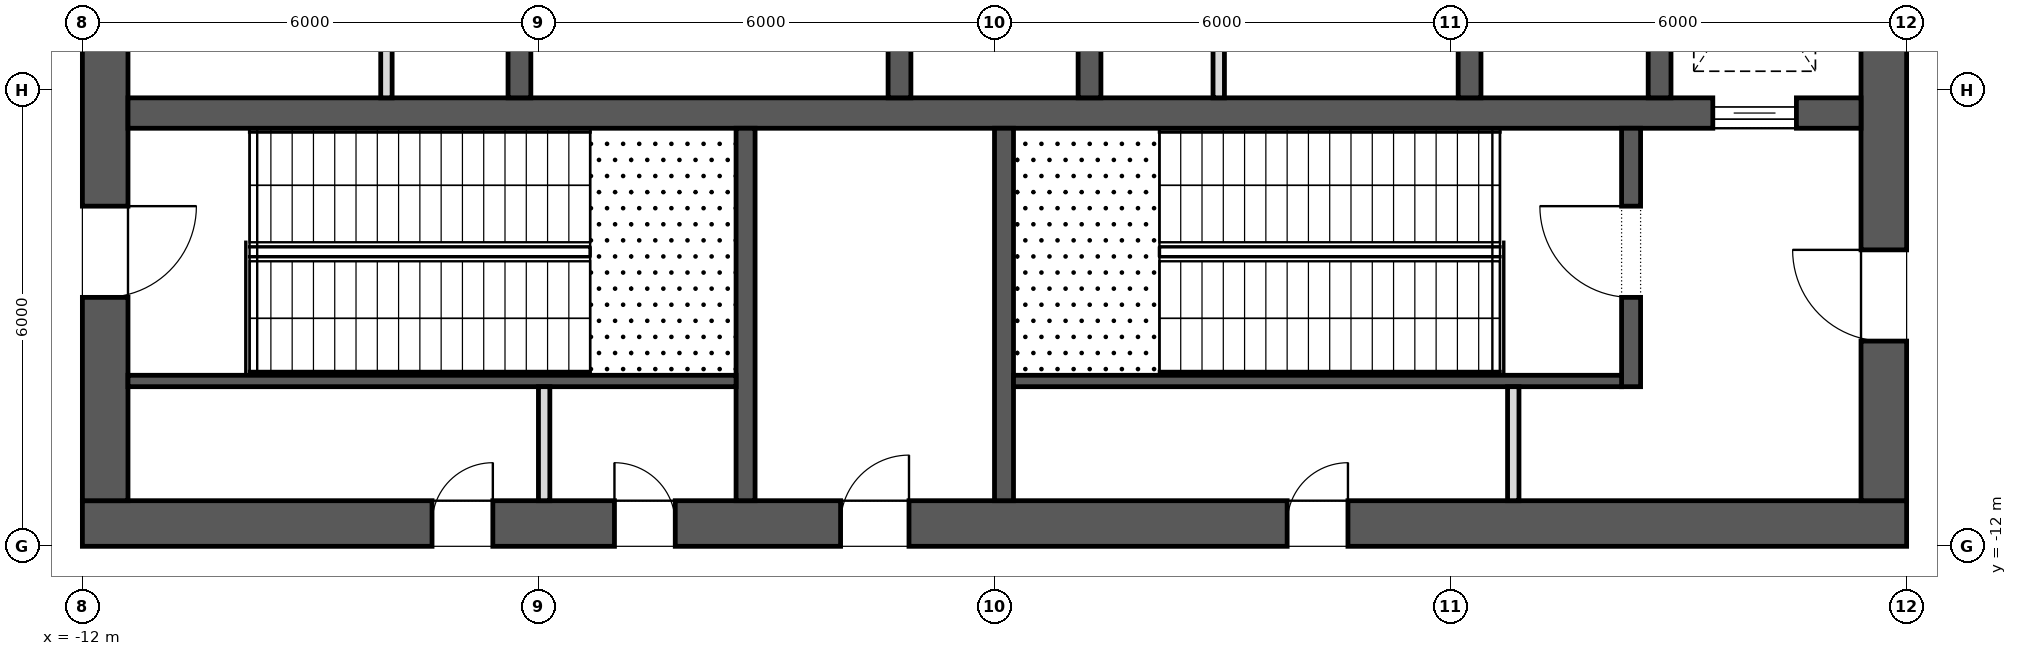
"""IFC4 building model, lengths in metres.
Left out: names, types, materials, properties, quantities, classifications, styles, units other than length and angle.
Written with IfcOpenShell. Run it as: python <this file> out.ifc"""

import sys

from ifc_helpers import new_model, si_unit, direction, frame, frame_2d, origin, place, context, subcontext, project, spatial, rectangle, extrude, element, fill, save


model = new_model("IFC4")
c1 = context("Model", 3, precision=1e-05, world=origin(), true_north=direction((0.0, 1.0)))
c2 = subcontext(c1, "Body", "Model", "MODEL_VIEW")
j1 = project(units=[si_unit("LENGTHUNIT", "METRE"), si_unit("PLANEANGLEUNIT", "RADIAN")], contexts=[c1])
p1 = place(None, origin())
s1 = spatial("IfcSite", under=j1, at=p1, CompositionType="ELEMENT")
p2 = place(p1, origin())
s2 = spatial("IfcBuilding", under=s1, at=p2, CompositionType="ELEMENT")
p3 = place(p2, frame((0.0, 0.0, 343.3)))
s3 = spatial("IfcBuildingStorey", under=s2, at=p3, CompositionType="ELEMENT", Elevation=343.3)
p4 = place(p3, frame((-12.0, -11.7, 0.0), z_axis=(0.0, 0.0, 1.0), x_axis=(1.0, 0.0, 0.0)))
e1 = element("IfcWall", 1, at=p4, inside=s3, PredefinedType="SHEAR", context=c2, shape_type="SweptSolid", body=[
    extrude(rectangle(XDim=24.0, YDim=0.6, at=frame_2d((12.0, 0.0))), origin(), (0.0, 0.0, 1.0), 6.0),
])
p5 = place(p4, frame((9.975, 0.0, 0.0)))
e2 = element("IfcOpeningElement", 2, at=p5, cuts=e1, PredefinedType="OPENING", context=c2, shape_type="SweptSolid", body=[
    extrude(rectangle(XDim=0.9, YDim=2.1, at=frame_2d((0.45, 1.05))), frame((0.0, 0.312, 0.0), z_axis=(0.0, -1.0, 0.0), x_axis=(1.0, 0.0, 0.0)), (0.0, 0.0, 1.0), 0.624),
])
p6 = place(p4, frame((4.6, 0.0, 0.0)))
e3 = element("IfcOpeningElement", 3, at=p6, cuts=e1, PredefinedType="OPENING", context=c2, shape_type="SweptSolid", body=[
    extrude(rectangle(XDim=0.8, YDim=2.1, at=frame_2d((0.4, 1.05))), frame((0.0, 0.312, 0.0), z_axis=(0.0, -1.0, 0.0), x_axis=(1.0, 0.0, 0.0)), (0.0, 0.0, 1.0), 0.624),
])
p7 = place(p4, frame((7.0, 0.0, 0.0)))
e4 = element("IfcOpeningElement", 4, at=p7, cuts=e1, PredefinedType="OPENING", context=c2, shape_type="SweptSolid", body=[
    extrude(rectangle(XDim=0.8, YDim=2.1, at=frame_2d((0.4, 1.05))), frame((0.0, 0.312, 0.0), z_axis=(0.0, -1.0, 0.0), x_axis=(1.0, 0.0, 0.0)), (0.0, 0.0, 1.0), 0.624),
])
p8 = place(p4, frame((15.85, 0.0, 0.0)))
e5 = element("IfcOpeningElement", 5, at=p8, cuts=e1, PredefinedType="OPENING", context=c2, shape_type="SweptSolid", body=[
    extrude(rectangle(XDim=0.8, YDim=2.1, at=frame_2d((0.4, 1.05))), frame((0.0, 0.312, 0.0), z_axis=(0.0, -1.0, 0.0), x_axis=(1.0, 0.0, 0.0)), (0.0, 0.0, 1.0), 0.624),
])
p9 = place(p3, frame((11.7, -11.4, 0.0), z_axis=(0.0, 0.0, 1.0), x_axis=(0.0, 1.0, 0.0)))
e6 = element("IfcWall", 6, at=p9, inside=s3, PredefinedType="SHEAR", context=c2, shape_type="SweptSolid", body=[
    extrude(rectangle(XDim=22.8, YDim=0.6, at=frame_2d((11.4, 0.0))), origin(), (0.0, 0.0, 1.0), 6.0),
])
p10 = place(p9, frame((10.2, 0.0, 0.0)))
e7 = element("IfcOpeningElement", 7, at=p10, cuts=e6, PredefinedType="OPENING", context=c2, shape_type="SweptSolid", body=[
    extrude(rectangle(XDim=2.4, YDim=2.1, at=frame_2d((1.2, 1.05))), frame((0.0, 0.312, 0.0), z_axis=(0.0, -1.0, 0.0), x_axis=(1.0, 0.0, 0.0)), (0.0, 0.0, 1.0), 0.624),
])
p11 = place(p9, frame((19.5, 0.0, 0.0)))
e8 = element("IfcOpeningElement", 8, at=p11, cuts=e6, PredefinedType="OPENING", context=c2, shape_type="SweptSolid", body=[
    extrude(rectangle(XDim=1.2, YDim=2.1, at=frame_2d((0.6, 1.05))), frame((0.0, 0.312, 0.0), z_axis=(0.0, -1.0, 0.0), x_axis=(1.0, 0.0, 0.0)), (0.0, 0.0, 1.0), 0.624),
])
p12 = place(p9, frame((2.1, 0.0, 0.0)))
e9 = element("IfcOpeningElement", 9, at=p12, cuts=e6, PredefinedType="OPENING", context=c2, shape_type="SweptSolid", body=[
    extrude(rectangle(XDim=1.2, YDim=2.1, at=frame_2d((0.6, 1.05))), frame((0.0, 0.312, 0.0), z_axis=(0.0, -1.0, 0.0), x_axis=(1.0, 0.0, 0.0)), (0.0, 0.0, 1.0), 0.624),
])
p13 = place(p3, frame((-11.7, -11.4, 0.0), z_axis=(0.0, 0.0, 1.0), x_axis=(0.0, 1.0, 0.0)))
e10 = element("IfcWall", 10, at=p13, inside=s3, PredefinedType="SHEAR", context=c2, shape_type="SweptSolid", body=[
    extrude(rectangle(XDim=22.8, YDim=0.6, at=frame_2d((11.4, 0.0))), origin(), (0.0, 0.0, 1.0), 6.0),
])
p14 = place(p13, frame((10.2, 0.0, 0.0)))
e11 = element("IfcOpeningElement", 11, at=p14, cuts=e10, PredefinedType="OPENING", context=c2, shape_type="SweptSolid", body=[
    extrude(rectangle(XDim=2.4, YDim=2.1, at=frame_2d((1.2, 1.05))), frame((0.0, 0.312, 0.0), z_axis=(0.0, -1.0, 0.0), x_axis=(1.0, 0.0, 0.0)), (0.0, 0.0, 1.0), 0.624),
])
p15 = place(p13, frame((18.925, 0.0, 0.0)))
e12 = element("IfcOpeningElement", 12, at=p15, cuts=e10, PredefinedType="OPENING", context=c2, shape_type="SweptSolid", body=[
    extrude(rectangle(XDim=1.2, YDim=2.1, at=frame_2d((0.6, 1.05))), frame((0.0, 0.312, 0.0), z_axis=(0.0, -1.0, 0.0), x_axis=(1.0, 0.0, 0.0)), (0.0, 0.0, 1.0), 0.624),
])
p16 = place(p13, frame((2.675, 0.0, 0.0)))
e13 = element("IfcOpeningElement", 13, at=p16, cuts=e10, PredefinedType="OPENING", context=c2, shape_type="SweptSolid", body=[
    extrude(rectangle(XDim=1.2, YDim=2.1, at=frame_2d((0.6, 1.05))), frame((0.0, 0.312, 0.0), z_axis=(0.0, -1.0, 0.0), x_axis=(1.0, 0.0, 0.0)), (0.0, 0.0, 1.0), 0.624),
])
p17 = place(p3, frame((-11.4, -6.3, 0.0), z_axis=(0.0, 0.0, 1.0), x_axis=(1.0, 0.0, 0.0)))
e14 = element("IfcWall", 14, at=p17, inside=s3, PredefinedType="SHEAR", context=c2, shape_type="SweptSolid", body=[
    extrude(rectangle(XDim=22.8, YDim=0.4, at=frame_2d((11.4, 0.0))), origin(), (0.0, 0.0, 1.0), 6.0),
])
p18 = place(p17, frame((20.85, 0.0, 0.0)))
e15 = element("IfcOpeningElement", 15, at=p18, cuts=e14, PredefinedType="OPENING", context=c2, shape_type="SweptSolid", body=[
    extrude(rectangle(XDim=1.1, YDim=2.1, at=frame_2d((0.55, 1.05))), frame((0.0, 0.212, 0.0), z_axis=(0.0, -1.0, 0.0), x_axis=(1.0, 0.0, 0.0)), (0.0, 0.0, 1.0), 0.424),
])
for number, where, z_axis, x_axis in (
    (16, (-6.25, -6.1, 0.0), (0.0, 0.0, 1.0), (0.0, 1.0, 0.0)),
    (17, (-1.25, -6.1, 0.0), (0.0, 0.0, 1.0), (0.0, 1.0, 0.0)),
    (18, (1.25, -6.1, 0.0), (0.0, 0.0, 1.0), (0.0, 1.0, 0.0)),
    (19, (6.25, -6.1, 0.0), (0.0, 0.0, 1.0), (0.0, 1.0, 0.0)),
    (20, (8.75, -6.1, 0.0), (0.0, 0.0, 1.0), (0.0, 1.0, 0.0)),
):
    element("IfcWall", number, at=place(p3, frame(where, z_axis=z_axis, x_axis=x_axis)), inside=s3, PredefinedType="SHEAR", context=c2, shape_type="SweptSolid", body=[
        extrude(rectangle(XDim=2.9, YDim=0.3, at=frame_2d((1.45, 0.0))), origin(), (0.0, 0.0, 1.0), 6.0),
    ])
for number, where, z_axis, x_axis in (
    (21, (-3.275, -11.4, 0.0), (0.0, 0.0, 1.0), (0.0, 1.0, 0.0)),
    (22, (0.125, -11.4, 0.0), (0.0, 0.0, 1.0), (0.0, 1.0, 0.0)),
):
    element("IfcWall", number, at=place(p3, frame(where, z_axis=z_axis, x_axis=x_axis)), inside=s3, PredefinedType="SHEAR", context=c2, shape_type="SweptSolid", body=[
        extrude(rectangle(XDim=4.9, YDim=0.25, at=frame_2d((2.45, 0.0))), origin(), (0.0, 0.0, 1.0), 5.65),
    ])
p19 = place(p3, frame((8.375, -9.9, 0.0), z_axis=(0.0, 0.0, 1.0), x_axis=(0.0, 1.0, 0.0)))
e23 = element("IfcWall", 23, at=p19, inside=s3, PredefinedType="SHEAR", context=c2, shape_type="SweptSolid", body=[
    extrude(rectangle(XDim=3.4, YDim=0.25, at=frame_2d((1.7, 0.0))), origin(), (0.0, 0.0, 1.0), 5.65),
])
p20 = place(p19, frame((1.175, 0.0, 0.0)))
e24 = element("IfcOpeningElement", 24, at=p20, cuts=e23, PredefinedType="OPENING", context=c2, shape_type="SweptSolid", body=[
    extrude(rectangle(XDim=1.2, YDim=2.1, at=frame_2d((0.6, 1.05))), frame((0.0, 0.137, 0.0), z_axis=(0.0, -1.0, 0.0), x_axis=(1.0, 0.0, 0.0)), (0.0, 0.0, 1.0), 0.274),
])
for number, where, z_axis, x_axis in (
    (25, (-11.4, -9.825, 0.0), (0.0, 0.0, 1.0), (1.0, 0.0, 0.0)),
    (26, (0.25, -9.825, 0.0), (0.0, 0.0, 1.0), (1.0, 0.0, 0.0)),
):
    element("IfcWall", number, at=place(p3, frame(where, z_axis=z_axis, x_axis=x_axis)), inside=s3, PredefinedType="SHEAR", context=c2, shape_type="SweptSolid", body=[
        extrude(rectangle(XDim=8.0, YDim=0.15, at=frame_2d((4.0, 0.0))), origin(), (0.0, 0.0, 1.0), 5.65),
    ])
for number, where, z_axis, x_axis in (
    (27, (-5.925, -11.4, 0.0), (0.0, 0.0, 1.0), (0.0, 1.0, 0.0)),
    (28, (6.825, -11.4, 0.0), (0.0, 0.0, 1.0), (0.0, 1.0, 0.0)),
):
    element("IfcWall", number, at=place(p3, frame(where, z_axis=z_axis, x_axis=x_axis)), inside=s3, PredefinedType="PARTITIONING", context=c2, shape_type="SweptSolid", body=[
        extrude(rectangle(XDim=1.5, YDim=0.15, at=frame_2d((0.75, 0.0))), origin(), (0.0, 0.0, 1.0), 5.65),
    ])
for number, where, z_axis, x_axis in (
    (29, (2.95, -6.1, 0.0), (0.0, 0.0, 1.0), (0.0, 1.0, 0.0)),
    (30, (-8.0, -6.1, 0.0), (0.0, 0.0, 1.0), (0.0, 1.0, 0.0)),
):
    element("IfcWall", number, at=place(p3, frame(where, z_axis=z_axis, x_axis=x_axis)), inside=s3, PredefinedType="PARTITIONING", context=c2, shape_type="SweptSolid", body=[
        extrude(rectangle(XDim=2.9, YDim=0.15, at=frame_2d((1.45, 0.0))), origin(), (0.0, 0.0, 1.0), 5.65),
    ])
p21 = place(p18, origin())
e31 = element("IfcDoor", 31, at=p21, inside=s3, OperationType="SLIDING_TO_LEFT", PredefinedType="DOOR", context=c2, shape_type="SweptSolid", body=[
    extrude(rectangle(XDim=1.1, YDim=2.1, at=frame_2d((0.55, 1.05))), frame((0.0, 0.025, 0.0), z_axis=(0.0, -1.0, 0.0), x_axis=(1.0, 0.0, 0.0)), (0.0, 0.0, 1.0), 0.05),
])
fill(e15, e31)
p22 = place(p16, frame((1.2, 0.0, 0.0), z_axis=(0.0, 0.0, 1.0), x_axis=(-1.0, 0.0, 0.0)))
e32 = element("IfcDoor", 32, at=p22, inside=s3, OperationType="SINGLE_SWING_RIGHT", PredefinedType="DOOR", context=c2, shape_type="SweptSolid", body=[
    extrude(rectangle(XDim=1.2, YDim=2.1, at=frame_2d((0.6, 1.05))), frame((0.0, 0.025, 0.0), z_axis=(0.0, -1.0, 0.0), x_axis=(1.0, 0.0, 0.0)), (0.0, 0.0, 1.0), 0.05),
])
fill(e13, e32)
p23 = place(p20, origin())
e33 = element("IfcDoor", 33, at=p23, inside=s3, OperationType="SINGLE_SWING_LEFT", PredefinedType="DOOR", context=c2, shape_type="SweptSolid", body=[
    extrude(rectangle(XDim=1.2, YDim=2.1, at=frame_2d((0.6, 1.05))), frame((0.0, 0.025, 0.0), z_axis=(0.0, -1.0, 0.0), x_axis=(1.0, 0.0, 0.0)), (0.0, 0.0, 1.0), 0.05),
])
fill(e24, e33)
p24 = place(p12, origin())
e34 = element("IfcDoor", 34, at=p24, inside=s3, OperationType="SINGLE_SWING_LEFT", PredefinedType="DOOR", context=c2, shape_type="SweptSolid", body=[
    extrude(rectangle(XDim=1.2, YDim=2.1, at=frame_2d((0.6, 1.05))), frame((0.0, 0.025, 0.0), z_axis=(0.0, -1.0, 0.0), x_axis=(1.0, 0.0, 0.0)), (0.0, 0.0, 1.0), 0.05),
])
fill(e9, e34)
p25 = place(p5, origin())
e35 = element("IfcDoor", 35, at=p25, inside=s3, OperationType="SINGLE_SWING_LEFT", PredefinedType="DOOR", context=c2, shape_type="SweptSolid", body=[
    extrude(rectangle(XDim=0.9, YDim=2.1, at=frame_2d((0.45, 1.05))), frame((0.0, 0.025, 0.0), z_axis=(0.0, -1.0, 0.0), x_axis=(1.0, 0.0, 0.0)), (0.0, 0.0, 1.0), 0.05),
])
fill(e2, e35)
p26 = place(p6, origin())
e36 = element("IfcDoor", 36, at=p26, inside=s3, OperationType="SINGLE_SWING_LEFT", PredefinedType="DOOR", context=c2, shape_type="SweptSolid", body=[
    extrude(rectangle(XDim=0.8, YDim=2.1, at=frame_2d((0.4, 1.05))), frame((0.0, 0.025, 0.0), z_axis=(0.0, -1.0, 0.0), x_axis=(1.0, 0.0, 0.0)), (0.0, 0.0, 1.0), 0.05),
])
fill(e3, e36)
p27 = place(p7, origin())
e37 = element("IfcDoor", 37, at=p27, inside=s3, OperationType="SINGLE_SWING_RIGHT", PredefinedType="DOOR", context=c2, shape_type="SweptSolid", body=[
    extrude(rectangle(XDim=0.8, YDim=2.1, at=frame_2d((0.4, 1.05))), frame((0.0, 0.025, 0.0), z_axis=(0.0, -1.0, 0.0), x_axis=(1.0, 0.0, 0.0)), (0.0, 0.0, 1.0), 0.05),
])
fill(e4, e37)
p28 = place(p8, origin())
e38 = element("IfcDoor", 38, at=p28, inside=s3, OperationType="SINGLE_SWING_LEFT", PredefinedType="DOOR", context=c2, shape_type="SweptSolid", body=[
    extrude(rectangle(XDim=0.8, YDim=2.1, at=frame_2d((0.4, 1.05))), frame((0.0, 0.025, 0.0), z_axis=(0.0, -1.0, 0.0), x_axis=(1.0, 0.0, 0.0)), (0.0, 0.0, 1.0), 0.05),
])
fill(e5, e38)
save(model, sys.argv[1])
